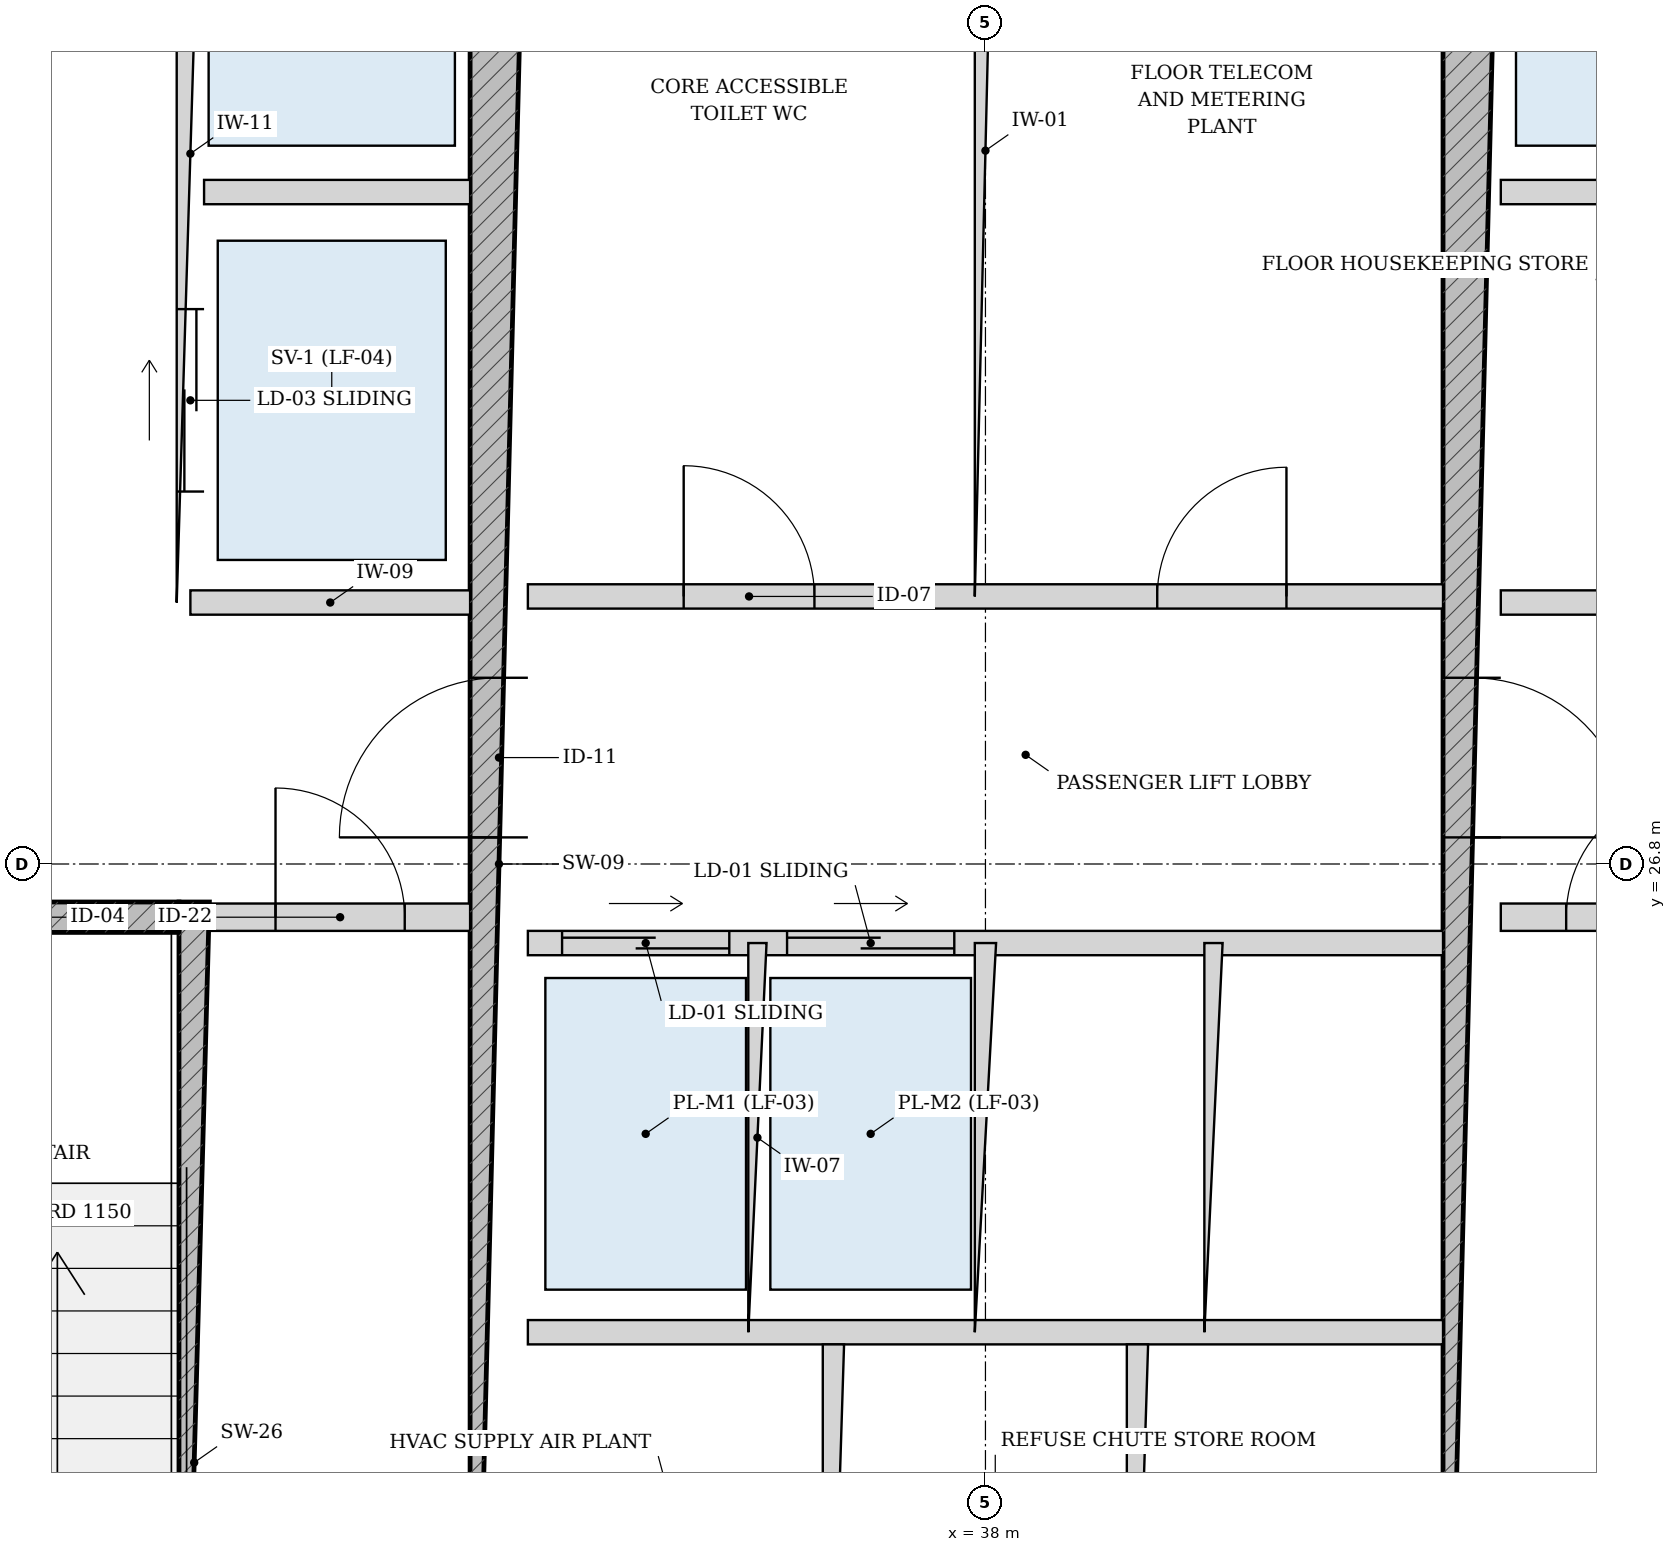
"""IFC4 building model, lengths in metres.
Left out: names, types, materials, properties, quantities, classifications, styles, units other than length and angle.
Written with IfcOpenShell. Run it as: python <this file> out.ifc"""

import sys

from ifc_helpers import new_model, si_unit, direction, frame, frame_2d, origin, place, context, subcontext, project, spatial, rectangle, extrude, source, transform, mapped, element, fill, save


model = new_model("IFC4")
c1 = context("Model", 3, precision=1e-05, world=origin(), true_north=direction((-0.2419218956, 0.970295726276)))
c2 = subcontext(c1, "Body", "Model", "MODEL_VIEW")
j1 = project(units=[si_unit("LENGTHUNIT", "METRE"), si_unit("PLANEANGLEUNIT", "RADIAN")], contexts=[c1])
p1 = place(None, origin())
s1 = spatial("IfcSite", under=j1, at=p1, CompositionType="ELEMENT")
p2 = place(p1, origin())
s2 = spatial("IfcBuilding", under=s1, at=p2, CompositionType="ELEMENT")
p3 = place(p2, frame((0.0, 0.0, 235.6)))
s3 = spatial("IfcBuildingStorey", under=s2, at=p3, CompositionType="ELEMENT", Elevation=235.6)
p4 = place(p3, frame((32.795, 19.175, 0.0), z_axis=(0.0, 0.0, 1.0), x_axis=(0.0, 1.0, 0.0)))
e1 = element("IfcWall", 1, at=p4, inside=s3, PredefinedType="SOLIDWALL", context=c2, shape_type="SweptSolid", body=[
    extrude(rectangle(XDim=7.375, YDim=0.2, at=frame_2d((3.688, 0.0))), origin(), (0.0, 0.0, 1.0), 3.435),
])
p5 = place(p3, frame((29.375, 26.45, 0.0), z_axis=(0.0, 0.0, 1.0), x_axis=(1.0, 0.0, 0.0)))
e2 = element("IfcWall", 2, at=p5, inside=s3, PredefinedType="SOLIDWALL", context=c2, shape_type="SweptSolid", body=[
    extrude(rectangle(XDim=3.32, YDim=0.2, at=frame_2d((1.66, 0.0))), origin(), (0.0, 0.0, 1.0), 3.435),
])
p6 = place(p5, frame((1.185, 0.0, 0.0)))
e3 = element("IfcOpeningElement", 3, at=p6, cuts=e2, PredefinedType="OPENING", context=c2, shape_type="SweptSolid", body=[
    extrude(rectangle(XDim=0.95, YDim=2.15, at=frame_2d((0.475, 1.075))), frame((0.0, 0.11, 0.0), z_axis=(0.0, -1.0, 0.0), x_axis=(1.0, 0.0, 0.0)), (0.0, 0.0, 1.0), 0.22),
])
p7 = place(p3, frame((34.8, 19.175, 0.0), z_axis=(0.0, 0.0, 1.0), x_axis=(0.0, 1.0, 0.0)))
e4 = element("IfcWall", 4, at=p7, inside=s3, PredefinedType="SHEAR", context=c2, shape_type="SweptSolid", body=[
    extrude(rectangle(XDim=15.25, YDim=0.38, at=frame_2d((7.625, 0.0))), origin(), (0.0, 0.0, 1.0), 3.435),
])
p8 = place(p7, frame((7.8, 0.0, 0.0)))
e5 = element("IfcOpeningElement", 5, at=p8, cuts=e4, PredefinedType="OPENING", context=c2, shape_type="SweptSolid", body=[
    extrude(rectangle(XDim=1.05, YDim=2.15, at=frame_2d((0.525, 1.075))), frame((0.0, 0.2, 0.0), z_axis=(0.0, -1.0, 0.0), x_axis=(1.0, 0.0, 0.0)), (0.0, 0.0, 1.0), 0.4),
])
p9 = place(p3, frame((41.2, 19.175, 0.0), z_axis=(0.0, 0.0, 1.0), x_axis=(0.0, 1.0, 0.0)))
e6 = element("IfcWall", 6, at=p9, inside=s3, PredefinedType="SHEAR", context=c2, shape_type="SweptSolid", body=[
    extrude(rectangle(XDim=15.25, YDim=0.38, at=frame_2d((7.625, 0.0))), origin(), (0.0, 0.0, 1.0), 3.435),
])
p10 = place(p9, frame((7.8, 0.0, 0.0)))
e7 = element("IfcOpeningElement", 7, at=p10, cuts=e6, PredefinedType="OPENING", context=c2, shape_type="SweptSolid", body=[
    extrude(rectangle(XDim=1.05, YDim=2.15, at=frame_2d((0.525, 1.075))), frame((0.0, 0.2, 0.0), z_axis=(0.0, -1.0, 0.0), x_axis=(1.0, 0.0, 0.0)), (0.0, 0.0, 1.0), 0.4),
])
p11 = place(p3, frame((32.9, 26.45, 0.0), z_axis=(0.0, 0.0, 1.0), x_axis=(1.0, 0.0, 0.0)))
e8 = element("IfcWall", 8, at=p11, inside=s3, PredefinedType="PARTITIONING", context=c2, shape_type="SweptSolid", body=[
    extrude(rectangle(XDim=1.71, YDim=0.18, at=frame_2d((0.855, 0.0))), origin(), (0.0, 0.0, 1.0), 3.435),
])
p12 = place(p11, frame((0.43, 0.0, 0.0)))
e9 = element("IfcOpeningElement", 9, at=p12, cuts=e8, PredefinedType="OPENING", context=c2, shape_type="SweptSolid", body=[
    extrude(rectangle(XDim=0.85, YDim=2.1, at=frame_2d((0.425, 1.05))), frame((0.0, 0.1, 0.0), z_axis=(0.0, -1.0, 0.0), x_axis=(1.0, 0.0, 0.0)), (0.0, 0.0, 1.0), 0.2),
])
p13 = place(p3, frame((41.39, 26.45, 0.0), z_axis=(0.0, 0.0, 1.0), x_axis=(1.0, 0.0, 0.0)))
e10 = element("IfcWall", 10, at=p13, inside=s3, PredefinedType="PARTITIONING", context=c2, shape_type="SweptSolid", body=[
    extrude(rectangle(XDim=1.71, YDim=0.18, at=frame_2d((0.855, 0.0))), origin(), (0.0, 0.0, 1.0), 3.435),
])
p14 = place(p13, frame((0.43, 0.0, 0.0)))
e11 = element("IfcOpeningElement", 11, at=p14, cuts=e10, PredefinedType="OPENING", context=c2, shape_type="SweptSolid", body=[
    extrude(rectangle(XDim=0.85, YDim=2.1, at=frame_2d((0.425, 1.05))), frame((0.0, 0.1, 0.0), z_axis=(0.0, -1.0, 0.0), x_axis=(1.0, 0.0, 0.0)), (0.0, 0.0, 1.0), 0.2),
])
p15 = place(p3, frame((32.77, 28.52, 0.0), z_axis=(0.0, 0.0, 1.0), x_axis=(0.0, 1.0, 0.0)))
e12 = element("IfcWall", 12, at=p15, inside=s3, PredefinedType="PARTITIONING", context=c2, shape_type="SweptSolid", body=[
    extrude(rectangle(XDim=5.905, YDim=0.18, at=frame_2d((2.953, 0.0))), origin(), (0.0, 0.0, 1.0), 3.435),
])
p16 = place(p15, frame((3.655, 0.0, 0.0)))
e13 = element("IfcOpeningElement", 13, at=p16, cuts=e12, PredefinedType="OPENING", context=c2, shape_type="SweptSolid", body=[
    extrude(rectangle(XDim=1.15, YDim=2.2, at=frame_2d((0.575, 1.1))), frame((0.0, 0.1, 0.0), z_axis=(0.0, -1.0, 0.0), x_axis=(1.0, 0.0, 0.0)), (0.0, 0.0, 1.0), 0.2),
])
p17 = place(p15, frame((0.73, 0.0, 0.0)))
e14 = element("IfcOpeningElement", 14, at=p17, cuts=e12, PredefinedType="OPENING", context=c2, shape_type="SweptSolid", body=[
    extrude(rectangle(XDim=1.2, YDim=2.25, at=frame_2d((0.6, 1.125))), frame((0.0, 0.1, 0.0), z_axis=(0.0, -1.0, 0.0), x_axis=(1.0, 0.0, 0.0)), (0.0, 0.0, 1.0), 0.2),
])
p18 = place(p3, frame((32.86, 31.22, 0.0), z_axis=(0.0, 0.0, 1.0), x_axis=(1.0, 0.0, 0.0)))
e15 = element("IfcWall", 15, at=p18, inside=s3, PredefinedType="PARTITIONING", context=c2, shape_type="SweptSolid", body=[
    extrude(rectangle(XDim=1.75, YDim=0.16, at=frame_2d((0.875, 0.0))), origin(), (0.0, 0.0, 1.0), 3.435),
])
p19 = place(p3, frame((32.77, 28.52, 0.0), z_axis=(0.0, 0.0, 1.0), x_axis=(1.0, 0.0, 0.0)))
e16 = element("IfcWall", 16, at=p19, inside=s3, PredefinedType="PARTITIONING", context=c2, shape_type="SweptSolid", body=[
    extrude(rectangle(XDim=1.84, YDim=0.16, at=frame_2d((0.92, 0.0))), origin(), (0.0, 0.0, 1.0), 3.435),
])
p20 = place(p3, frame((41.39, 31.22, 0.0), z_axis=(0.0, 0.0, 1.0), x_axis=(1.0, 0.0, 0.0)))
e17 = element("IfcWall", 17, at=p20, inside=s3, PredefinedType="PARTITIONING", context=c2, shape_type="SweptSolid", body=[
    extrude(rectangle(XDim=1.75, YDim=0.16, at=frame_2d((0.875, 0.0))), origin(), (0.0, 0.0, 1.0), 3.435),
])
p21 = place(p3, frame((41.39, 28.52, 0.0), z_axis=(0.0, 0.0, 1.0), x_axis=(1.0, 0.0, 0.0)))
e18 = element("IfcWall", 18, at=p21, inside=s3, PredefinedType="PARTITIONING", context=c2, shape_type="SweptSolid", body=[
    extrude(rectangle(XDim=1.84, YDim=0.16, at=frame_2d((0.92, 0.0))), origin(), (0.0, 0.0, 1.0), 3.435),
])
p22 = place(p3, frame((34.99, 28.56, 0.0), z_axis=(0.0, 0.0, 1.0), x_axis=(1.0, 0.0, 0.0)))
e19 = element("IfcWall", 19, at=p22, inside=s3, PredefinedType="PARTITIONING", context=c2, shape_type="SweptSolid", body=[
    extrude(rectangle(XDim=6.02, YDim=0.16, at=frame_2d((3.01, 0.0))), origin(), (0.0, 0.0, 1.0), 3.435),
])
p23 = place(p22, frame((1.025, 0.0, 0.0)))
e20 = element("IfcOpeningElement", 20, at=p23, cuts=e19, PredefinedType="OPENING", context=c2, shape_type="SweptSolid", body=[
    extrude(rectangle(XDim=0.86, YDim=2.1, at=frame_2d((0.43, 1.05))), frame((0.0, 0.09, 0.0), z_axis=(0.0, -1.0, 0.0), x_axis=(1.0, 0.0, 0.0)), (0.0, 0.0, 1.0), 0.18),
])
p24 = place(p22, frame((4.14, 0.0, 0.0)))
e21 = element("IfcOpeningElement", 21, at=p24, cuts=e19, PredefinedType="OPENING", context=c2, shape_type="SweptSolid", body=[
    extrude(rectangle(XDim=0.85, YDim=2.1, at=frame_2d((0.425, 1.05))), frame((0.0, 0.09, 0.0), z_axis=(0.0, -1.0, 0.0), x_axis=(1.0, 0.0, 0.0)), (0.0, 0.0, 1.0), 0.18),
])
p25 = place(p3, frame((38.0, 28.56, 0.0), z_axis=(0.0, 0.0, 1.0), x_axis=(0.0, 1.0, 0.0)))
e22 = element("IfcWall", 22, at=p25, inside=s3, PredefinedType="PARTITIONING", context=c2, shape_type="SweptSolid", body=[
    extrude(rectangle(XDim=5.865, YDim=0.14, at=frame_2d((2.933, 0.0))), origin(), (0.0, 0.0, 1.0), 3.435),
])
p26 = place(p3, frame((34.99, 26.28, 0.0), z_axis=(0.0, 0.0, 1.0), x_axis=(1.0, 0.0, 0.0)))
e23 = element("IfcWall", 23, at=p26, inside=s3, PredefinedType="PARTITIONING", context=c2, shape_type="SweptSolid", body=[
    extrude(rectangle(XDim=6.02, YDim=0.16, at=frame_2d((3.01, 0.0))), origin(), (0.0, 0.0, 1.0), 3.435),
])
p27 = place(p26, frame((0.225, 0.0, 0.0)))
e24 = element("IfcOpeningElement", 24, at=p27, cuts=e23, PredefinedType="OPENING", context=c2, shape_type="SweptSolid", body=[
    extrude(rectangle(XDim=1.1, YDim=2.2, at=frame_2d((0.55, 1.1))), frame((0.0, 0.09, 0.0), z_axis=(0.0, -1.0, 0.0), x_axis=(1.0, 0.0, 0.0)), (0.0, 0.0, 1.0), 0.18),
])
p28 = place(p26, frame((1.705, 0.0, 0.0)))
e25 = element("IfcOpeningElement", 25, at=p28, cuts=e23, PredefinedType="OPENING", context=c2, shape_type="SweptSolid", body=[
    extrude(rectangle(XDim=1.1, YDim=2.2, at=frame_2d((0.55, 1.1))), frame((0.0, 0.09, 0.0), z_axis=(0.0, -1.0, 0.0), x_axis=(1.0, 0.0, 0.0)), (0.0, 0.0, 1.0), 0.18),
])
p29 = place(p3, frame((34.99, 23.72, 0.0), z_axis=(0.0, 0.0, 1.0), x_axis=(1.0, 0.0, 0.0)))
e26 = element("IfcWall", 26, at=p29, inside=s3, PredefinedType="PARTITIONING", context=c2, shape_type="SweptSolid", body=[
    extrude(rectangle(XDim=6.02, YDim=0.16, at=frame_2d((3.01, 0.0))), origin(), (0.0, 0.0, 1.0), 3.435),
])
p30 = place(p3, frame((36.5, 23.72, 0.0), z_axis=(0.0, 0.0, 1.0), x_axis=(0.0, 1.0, 0.0)))
e27 = element("IfcWall", 27, at=p30, inside=s3, PredefinedType="PARTITIONING", context=c2, shape_type="SweptSolid", body=[
    extrude(rectangle(XDim=2.56, YDim=0.12, at=frame_2d((1.28, 0.0))), origin(), (0.0, 0.0, 1.0), 3.435),
])
p31 = place(p3, frame((38.0, 23.72, 0.0), z_axis=(0.0, 0.0, 1.0), x_axis=(0.0, 1.0, 0.0)))
e28 = element("IfcWall", 28, at=p31, inside=s3, PredefinedType="PARTITIONING", context=c2, shape_type="SweptSolid", body=[
    extrude(rectangle(XDim=2.56, YDim=0.14, at=frame_2d((1.28, 0.0))), origin(), (0.0, 0.0, 1.0), 3.435),
])
p32 = place(p3, frame((39.5, 23.72, 0.0), z_axis=(0.0, 0.0, 1.0), x_axis=(0.0, 1.0, 0.0)))
e29 = element("IfcWall", 29, at=p32, inside=s3, PredefinedType="PARTITIONING", context=c2, shape_type="SweptSolid", body=[
    extrude(rectangle(XDim=2.56, YDim=0.12, at=frame_2d((1.28, 0.0))), origin(), (0.0, 0.0, 1.0), 3.435),
])
p33 = place(p3, frame((37.0, 19.175, 0.0), z_axis=(0.0, 0.0, 1.0), x_axis=(0.0, 1.0, 0.0)))
e30 = element("IfcWall", 30, at=p33, inside=s3, PredefinedType="PARTITIONING", context=c2, shape_type="SweptSolid", body=[
    extrude(rectangle(XDim=4.465, YDim=0.14, at=frame_2d((2.232, 0.0))), origin(), (0.0, 0.0, 1.0), 3.435),
])
p34 = place(p33, frame((1.808, 0.0, 0.0)))
e31 = element("IfcOpeningElement", 31, at=p34, cuts=e30, PredefinedType="OPENING", context=c2, shape_type="SweptSolid", body=[
    extrude(rectangle(XDim=0.85, YDim=2.1, at=frame_2d((0.425, 1.05))), frame((0.0, 0.08, 0.0), z_axis=(0.0, -1.0, 0.0), x_axis=(1.0, 0.0, 0.0)), (0.0, 0.0, 1.0), 0.16),
])
p35 = place(p3, frame((39.0, 19.175, 0.0), z_axis=(0.0, 0.0, 1.0), x_axis=(0.0, 1.0, 0.0)))
e32 = element("IfcWall", 32, at=p35, inside=s3, PredefinedType="PARTITIONING", context=c2, shape_type="SweptSolid", body=[
    extrude(rectangle(XDim=4.465, YDim=0.14, at=frame_2d((2.232, 0.0))), origin(), (0.0, 0.0, 1.0), 3.435),
])
p36 = place(p35, frame((1.808, 0.0, 0.0)))
e33 = element("IfcOpeningElement", 33, at=p36, cuts=e32, PredefinedType="OPENING", context=c2, shape_type="SweptSolid", body=[
    extrude(rectangle(XDim=0.85, YDim=2.1, at=frame_2d((0.425, 1.05))), frame((0.0, 0.08, 0.0), z_axis=(0.0, -1.0, 0.0), x_axis=(1.0, 0.0, 0.0)), (0.0, 0.0, 1.0), 0.16),
])
m1 = source(origin(), c2, "Body", "SweptSolid", [
    extrude(rectangle(XDim=1.05, YDim=2.15, at=frame_2d((0.525, 1.075))), frame((0.0, 0.025, 0.0), z_axis=(0.0, -1.0, 0.0), x_axis=(1.0, 0.0, 0.0)), (0.0, 0.0, 1.0), 0.05),
])
p37 = place(p8, origin())
e34 = element("IfcDoor", 34, at=p37, inside=s3, OperationType="SINGLE_SWING_LEFT", PredefinedType="DOOR", context=c2, shape_type="MappedRepresentation", body=[
    mapped(m1, transform((0.0, 0.0, 0.0), scale=1.0)),
])
fill(e5, e34)
p38 = place(p10, frame((1.05, 0.0, 0.0), z_axis=(0.0, 0.0, 1.0), x_axis=(-1.0, 0.0, 0.0)))
e35 = element("IfcDoor", 35, at=p38, inside=s3, OperationType="SINGLE_SWING_RIGHT", PredefinedType="DOOR", context=c2, shape_type="MappedRepresentation", body=[
    mapped(m1, transform((0.0, 0.0, 0.0), scale=1.0)),
])
fill(e7, e35)
m2 = source(origin(), c2, "Body", "SweptSolid", [
    extrude(rectangle(XDim=0.85, YDim=2.1, at=frame_2d((0.425, 1.05))), frame((0.0, 0.025, 0.0), z_axis=(0.0, -1.0, 0.0), x_axis=(1.0, 0.0, 0.0)), (0.0, 0.0, 1.0), 0.05),
])
p39 = place(p12, origin())
e36 = element("IfcDoor", 36, at=p39, inside=s3, OperationType="SINGLE_SWING_LEFT", PredefinedType="DOOR", context=c2, shape_type="MappedRepresentation", body=[
    mapped(m2, transform((0.0, 0.0, 0.0), scale=1.0)),
])
fill(e9, e36)
p40 = place(p14, origin())
e37 = element("IfcDoor", 37, at=p40, inside=s3, OperationType="SINGLE_SWING_RIGHT", PredefinedType="DOOR", context=c2, shape_type="MappedRepresentation", body=[
    mapped(m2, transform((0.0, 0.0, 0.0), scale=1.0)),
])
fill(e11, e37)
m3 = source(origin(), c2, "Body", "SweptSolid", [
    extrude(rectangle(XDim=0.86, YDim=2.1, at=frame_2d((0.43, 1.05))), frame((0.0, 0.025, 0.0), z_axis=(0.0, -1.0, 0.0), x_axis=(1.0, 0.0, 0.0)), (0.0, 0.0, 1.0), 0.05),
])
p41 = place(p23, origin())
e38 = element("IfcDoor", 38, at=p41, inside=s3, OperationType="SINGLE_SWING_LEFT", PredefinedType="DOOR", context=c2, shape_type="MappedRepresentation", body=[
    mapped(m3, transform((0.0, 0.0, 0.0), scale=1.0)),
])
fill(e20, e38)
p42 = place(p24, origin())
e39 = element("IfcDoor", 39, at=p42, inside=s3, OperationType="SINGLE_SWING_RIGHT", PredefinedType="DOOR", context=c2, shape_type="MappedRepresentation", body=[
    mapped(m2, transform((0.0, 0.0, 0.0), scale=1.0)),
])
fill(e21, e39)
m4 = source(origin(), c2, "Body", "SweptSolid", [
    extrude(rectangle(XDim=1.2, YDim=2.25, at=frame_2d((0.6, 1.125))), frame((0.0, 0.025, 0.0), z_axis=(0.0, -1.0, 0.0), x_axis=(1.0, 0.0, 0.0)), (0.0, 0.0, 1.0), 0.05),
])
p43 = place(p17, origin())
e40 = element("IfcDoor", 40, at=p43, inside=s3, OperationType="DOUBLE_DOOR_SLIDING", PredefinedType="DOOR", context=c2, shape_type="MappedRepresentation", body=[
    mapped(m4, transform((0.0, 0.0, 0.0), scale=1.0)),
])
fill(e14, e40)
m5 = source(origin(), c2, "Body", "SweptSolid", [
    extrude(rectangle(XDim=1.1, YDim=2.2, at=frame_2d((0.55, 1.1))), frame((0.0, 0.025, 0.0), z_axis=(0.0, -1.0, 0.0), x_axis=(1.0, 0.0, 0.0)), (0.0, 0.0, 1.0), 0.05),
])
p44 = place(p27, origin())
e41 = element("IfcDoor", 41, at=p44, inside=s3, OperationType="DOUBLE_DOOR_SLIDING", PredefinedType="DOOR", context=c2, shape_type="MappedRepresentation", body=[
    mapped(m5, transform((0.0, 0.0, 0.0), scale=1.0)),
])
fill(e24, e41)
p45 = place(p28, origin())
e42 = element("IfcDoor", 42, at=p45, inside=s3, OperationType="DOUBLE_DOOR_SLIDING", PredefinedType="DOOR", context=c2, shape_type="MappedRepresentation", body=[
    mapped(m5, transform((0.0, 0.0, 0.0), scale=1.0)),
])
fill(e25, e42)
save(model, sys.argv[1])
